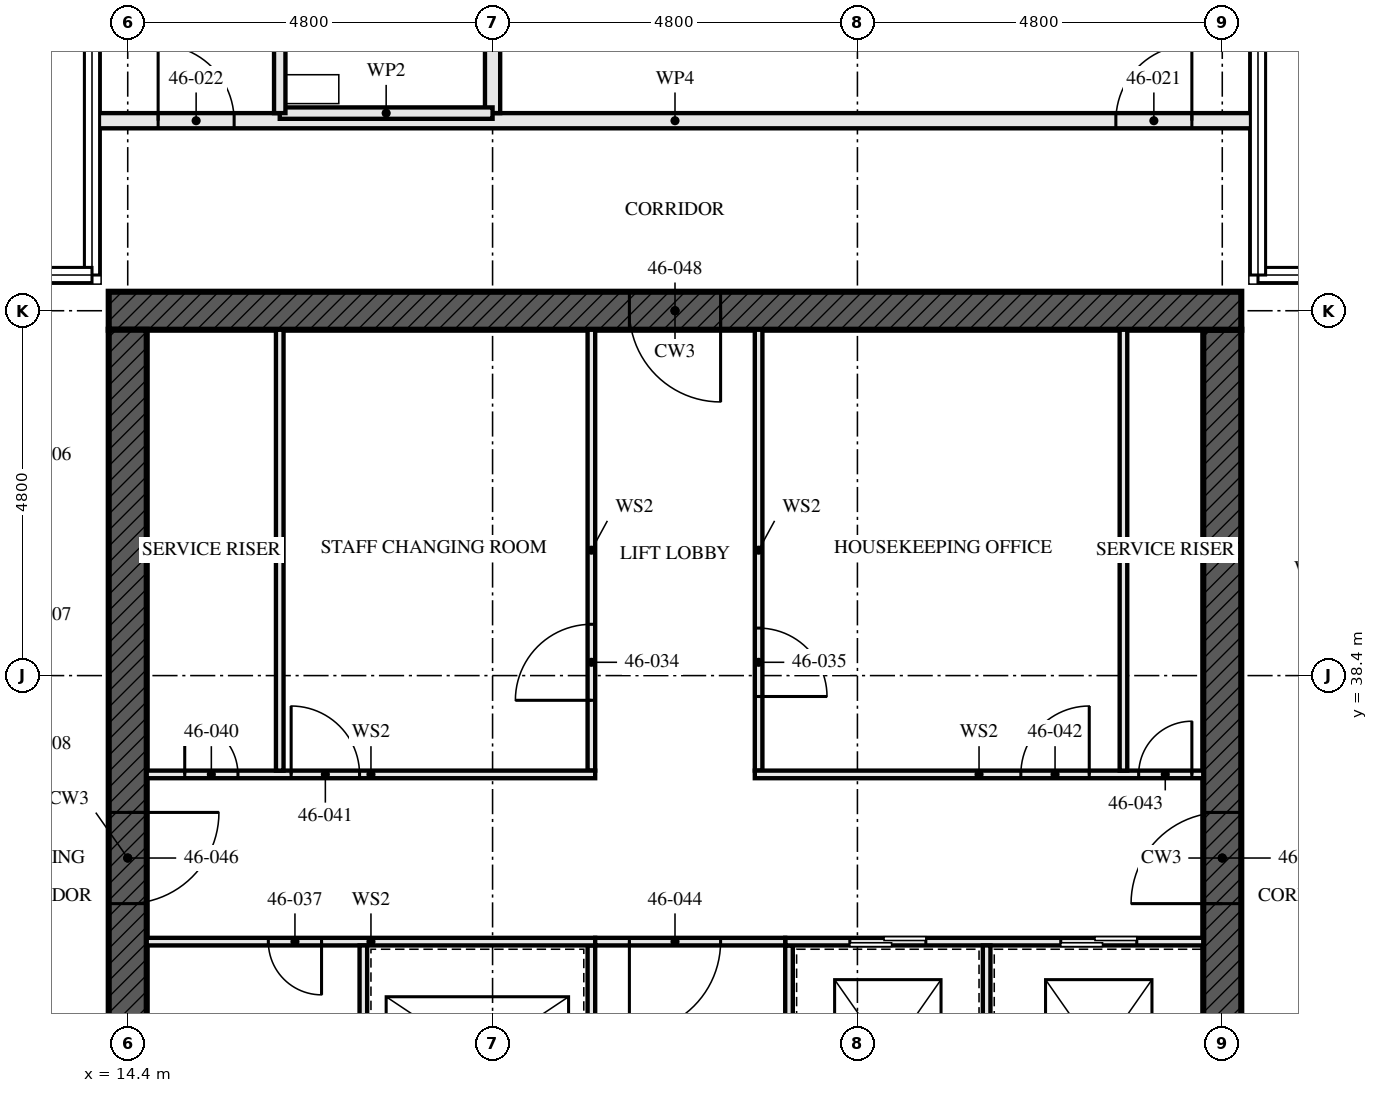
"""IFC4 building model, lengths in metres.
Left out: names, types, materials, properties, quantities, classifications, styles, units other than length and angle.
Written with IfcOpenShell. Run it as: python <this file> out.ifc"""

import sys

from ifc_helpers import new_model, si_unit, direction, frame, frame_2d, origin, place, context, subcontext, project, spatial, rectangle, extrude, element, fill, save


model = new_model("IFC4")
c1 = context("Model", 3, precision=1e-05, world=origin(), true_north=direction((0.0, 1.0)))
c2 = subcontext(c1, "Body", "Model", "MODEL_VIEW")
j1 = project(units=[si_unit("LENGTHUNIT", "METRE"), si_unit("PLANEANGLEUNIT", "RADIAN")], contexts=[c1])
p1 = place(None, origin())
s1 = spatial("IfcSite", under=j1, at=p1, CompositionType="ELEMENT")
p2 = place(p1, origin())
s2 = spatial("IfcBuilding", under=s1, at=p2, CompositionType="ELEMENT")
p3 = place(p2, frame((0.0, 0.0, 169.0)))
s3 = spatial("IfcBuildingStorey", under=s2, at=p3, CompositionType="ELEMENT", Elevation=169.0)
p4 = place(p3, frame((29.05, 43.2, -0.17), z_axis=(0.0, 0.0, 1.0), x_axis=(-1.0, 0.0, 0.0)))
e1 = element("IfcWall", 1, at=p4, inside=s3, PredefinedType="SHEAR", context=c2, shape_type="SweptSolid", body=[
    extrude(rectangle(XDim=14.9, YDim=0.5, at=frame_2d((7.45, 0.0))), origin(), (0.0, 0.0, 1.0), 3.5),
])
p5 = place(p4, frame((6.85, 0.0, 0.17)))
e2 = element("IfcOpeningElement", 2, at=p5, cuts=e1, PredefinedType="OPENING", context=c2, shape_type="SweptSolid", body=[
    extrude(rectangle(XDim=1.2, YDim=2.1, at=frame_2d((0.6, 1.05))), frame((0.0, 0.26, 0.0), z_axis=(0.0, -1.0, 0.0), x_axis=(1.0, 0.0, 0.0)), (0.0, 0.0, 1.0), 0.521),
])
p6 = place(p3, frame((14.4, 42.95, -0.17), z_axis=(0.0, 0.0, 1.0), x_axis=(0.0, -1.0, 0.0)))
e3 = element("IfcWall", 3, at=p6, inside=s3, PredefinedType="SHEAR", context=c2, shape_type="SweptSolid", body=[
    extrude(rectangle(XDim=13.9, YDim=0.5, at=frame_2d((6.95, 0.0))), origin(), (0.0, 0.0, 1.0), 3.5),
])
p7 = place(p6, frame((6.35, 0.0, 0.17)))
e4 = element("IfcOpeningElement", 4, at=p7, cuts=e3, PredefinedType="OPENING", context=c2, shape_type="SweptSolid", body=[
    extrude(rectangle(XDim=1.2, YDim=2.1, at=frame_2d((0.6, 1.05))), frame((0.0, 0.26, 0.0), z_axis=(0.0, -1.0, 0.0), x_axis=(1.0, 0.0, 0.0)), (0.0, 0.0, 1.0), 0.521),
])
p8 = place(p3, frame((28.8, 29.05, -0.17), z_axis=(0.0, 0.0, 1.0), x_axis=(0.0, 1.0, 0.0)))
e5 = element("IfcWall", 5, at=p8, inside=s3, PredefinedType="SHEAR", context=c2, shape_type="SweptSolid", body=[
    extrude(rectangle(XDim=13.9, YDim=0.5, at=frame_2d((6.95, 0.0))), origin(), (0.0, 0.0, 1.0), 3.5),
])
p9 = place(p8, frame((6.35, 0.0, 0.17)))
e6 = element("IfcOpeningElement", 6, at=p9, cuts=e5, PredefinedType="OPENING", context=c2, shape_type="SweptSolid", body=[
    extrude(rectangle(XDim=1.2, YDim=2.1, at=frame_2d((0.6, 1.05))), frame((0.0, 0.26, 0.0), z_axis=(0.0, -1.0, 0.0), x_axis=(1.0, 0.0, 0.0)), (0.0, 0.0, 1.0), 0.521),
])
p10 = place(p3, frame((19.2, 52.48, 0.0), z_axis=(0.0, 0.0, 1.0), x_axis=(0.0, -1.0, 0.0)))
e7 = element("IfcWall", 7, at=p10, inside=s3, PredefinedType="PARTITIONING", context=c2, shape_type="SweptSolid", body=[
    extrude(rectangle(XDim=6.68, YDim=0.2, at=frame_2d((3.34, 0.0))), origin(), (0.0, 0.0, 1.0), 2.55),
])
p11 = place(p3, frame((16.4, 48.8, 0.0), z_axis=(0.0, 0.0, 1.0), x_axis=(0.0, -1.0, 0.0)))
e8 = element("IfcWall", 8, at=p11, inside=s3, PredefinedType="PARTITIONING", context=c2, shape_type="SweptSolid", body=[
    extrude(rectangle(XDim=3.0, YDim=0.15, at=frame_2d((1.5, 0.0))), origin(), (0.0, 0.0, 1.0), 2.55),
])
p12 = place(p11, frame((1.05, 0.0, 0.0)))
e9 = element("IfcOpeningElement", 9, at=p12, cuts=e8, PredefinedType="OPENING", context=c2, shape_type="SweptSolid", body=[
    extrude(rectangle(XDim=0.9, YDim=2.1, at=frame_2d((0.45, 1.05))), frame((0.0, 0.085, 0.0), z_axis=(0.0, -1.0, 0.0), x_axis=(1.0, 0.0, 0.0)), (0.0, 0.0, 1.0), 0.171),
])
p13 = place(p3, frame((19.2, 45.8, 0.0), z_axis=(0.0, 0.0, 1.0), x_axis=(-1.0, 0.0, 0.0)))
e10 = element("IfcWall", 10, at=p13, inside=s3, PredefinedType="PARTITIONING", context=c2, shape_type="SweptSolid", body=[
    extrude(rectangle(XDim=2.8, YDim=0.15, at=frame_2d((1.4, 0.0))), origin(), (0.0, 0.0, 1.0), 3.33),
])
p14 = place(p3, frame((29.25, 45.7, 0.0), z_axis=(0.0, 0.0, 1.0), x_axis=(-1.0, 0.0, 0.0)))
e11 = element("IfcWall", 11, at=p14, inside=s3, PredefinedType="PARTITIONING", context=c2, shape_type="SweptSolid", body=[
    extrude(rectangle(XDim=15.3, YDim=0.2, at=frame_2d((7.65, 0.0))), origin(), (0.0, 0.0, 1.0), 2.32),
])
p15 = place(p14, frame((0.85, 0.0, 0.0)))
e12 = element("IfcOpeningElement", 12, at=p15, cuts=e11, PredefinedType="OPENING", context=c2, shape_type="SweptSolid", body=[
    extrude(rectangle(XDim=1.0, YDim=2.1, at=frame_2d((0.5, 1.05))), frame((0.0, 0.111, 0.0), z_axis=(0.0, -1.0, 0.0), x_axis=(1.0, 0.0, 0.0)), (0.0, 0.0, 1.0), 0.221),
])
p16 = place(p14, frame((13.45, 0.0, 0.0)))
e13 = element("IfcOpeningElement", 13, at=p16, cuts=e11, PredefinedType="OPENING", context=c2, shape_type="SweptSolid", body=[
    extrude(rectangle(XDim=1.0, YDim=2.1, at=frame_2d((0.5, 1.05))), frame((0.0, 0.111, 0.0), z_axis=(0.0, -1.0, 0.0), x_axis=(1.0, 0.0, 0.0)), (0.0, 0.0, 1.0), 0.221),
])
for number, where, z_axis, x_axis in (
    (14, (16.4, 37.15, 0.0), (0.0, 0.0, 1.0), (0.0, 1.0, 0.0)),
    (15, (27.5, 37.15, 0.0), (0.0, 0.0, 1.0), (0.0, 1.0, 0.0)),
):
    element("IfcWall", number, at=place(p3, frame(where, z_axis=z_axis, x_axis=x_axis)), inside=s3, PredefinedType="SOLIDWALL", context=c2, shape_type="SweptSolid", body=[
        extrude(rectangle(XDim=5.8, YDim=0.1, at=frame_2d((2.9, 0.0))), origin(), (0.0, 0.0, 1.0), 3.33),
    ])
p17 = place(p3, frame((20.5, 29.05, 0.0), z_axis=(0.0, 0.0, 1.0), x_axis=(0.0, 1.0, 0.0)))
e16 = element("IfcWall", 16, at=p17, inside=s3, PredefinedType="SOLIDWALL", context=c2, shape_type="SweptSolid", body=[
    extrude(rectangle(XDim=5.8, YDim=0.1, at=frame_2d((2.9, 0.0))), origin(), (0.0, 0.0, 1.0), 3.33),
])
p18 = place(p17, frame((0.8, 0.0, 0.0)))
e17 = element("IfcOpeningElement", 17, at=p18, cuts=e16, PredefinedType="OPENING", context=c2, shape_type="SweptSolid", body=[
    extrude(rectangle(XDim=1.1, YDim=2.3, at=frame_2d((0.55, 1.15))), frame((0.0, 0.061, 0.0), z_axis=(0.0, -1.0, 0.0), x_axis=(1.0, 0.0, 0.0)), (0.0, 0.0, 1.0), 0.121),
])
p19 = place(p17, frame((3.775, 0.0, 0.0)))
e18 = element("IfcOpeningElement", 18, at=p19, cuts=e16, PredefinedType="OPENING", context=c2, shape_type="SweptSolid", body=[
    extrude(rectangle(XDim=1.1, YDim=2.3, at=frame_2d((0.55, 1.15))), frame((0.0, 0.061, 0.0), z_axis=(0.0, -1.0, 0.0), x_axis=(1.0, 0.0, 0.0)), (0.0, 0.0, 1.0), 0.121),
])
p20 = place(p3, frame((20.5, 37.15, 0.0), z_axis=(0.0, 0.0, 1.0), x_axis=(0.0, 1.0, 0.0)))
e19 = element("IfcWall", 19, at=p20, inside=s3, PredefinedType="SOLIDWALL", context=c2, shape_type="SweptSolid", body=[
    extrude(rectangle(XDim=5.8, YDim=0.1, at=frame_2d((2.9, 0.0))), origin(), (0.0, 0.0, 1.0), 3.33),
])
p21 = place(p20, frame((0.925, 0.0, 0.0)))
e20 = element("IfcOpeningElement", 20, at=p21, cuts=e19, PredefinedType="OPENING", context=c2, shape_type="SweptSolid", body=[
    extrude(rectangle(XDim=1.0, YDim=2.1, at=frame_2d((0.5, 1.05))), frame((0.0, 0.061, 0.0), z_axis=(0.0, -1.0, 0.0), x_axis=(1.0, 0.0, 0.0)), (0.0, 0.0, 1.0), 0.121),
])
p22 = place(p3, frame((22.7, 37.15, 0.0), z_axis=(0.0, 0.0, 1.0), x_axis=(0.0, 1.0, 0.0)))
e21 = element("IfcWall", 21, at=p22, inside=s3, PredefinedType="SOLIDWALL", context=c2, shape_type="SweptSolid", body=[
    extrude(rectangle(XDim=5.8, YDim=0.1, at=frame_2d((2.9, 0.0))), origin(), (0.0, 0.0, 1.0), 3.33),
])
p23 = place(p22, frame((0.975, 0.0, 0.0)))
e22 = element("IfcOpeningElement", 22, at=p23, cuts=e21, PredefinedType="OPENING", context=c2, shape_type="SweptSolid", body=[
    extrude(rectangle(XDim=0.9, YDim=2.1, at=frame_2d((0.45, 1.05))), frame((0.0, 0.061, 0.0), z_axis=(0.0, -1.0, 0.0), x_axis=(1.0, 0.0, 0.0)), (0.0, 0.0, 1.0), 0.121),
])
p24 = place(p3, frame((23.1, 29.05, 0.0), z_axis=(0.0, 0.0, 1.0), x_axis=(0.0, 1.0, 0.0)))
e23 = element("IfcWall", 23, at=p24, inside=s3, PredefinedType="SOLIDWALL", context=c2, shape_type="SweptSolid", body=[
    extrude(rectangle(XDim=5.8, YDim=0.1, at=frame_2d((2.9, 0.0))), origin(), (0.0, 0.0, 1.0), 3.33),
])
p25 = place(p24, frame((1.0, 0.0, 0.0)))
e24 = element("IfcOpeningElement", 24, at=p25, cuts=e23, PredefinedType="OPENING", context=c2, shape_type="SweptSolid", body=[
    extrude(rectangle(XDim=0.7, YDim=2.1, at=frame_2d((0.35, 1.05))), frame((0.0, 0.061, 0.0), z_axis=(0.0, -1.0, 0.0), x_axis=(1.0, 0.0, 0.0)), (0.0, 0.0, 1.0), 0.121),
])
p26 = place(p3, frame((14.65, 34.9, 0.0), z_axis=(0.0, 0.0, 1.0), x_axis=(1.0, 0.0, 0.0)))
e25 = element("IfcWall", 25, at=p26, inside=s3, PredefinedType="SOLIDWALL", context=c2, shape_type="SweptSolid", body=[
    extrude(rectangle(XDim=5.9, YDim=0.1, at=frame_2d((2.95, 0.0))), origin(), (0.0, 0.0, 1.0), 3.33),
])
p27 = place(p26, frame((1.6, 0.0, 0.0)))
e26 = element("IfcOpeningElement", 26, at=p27, cuts=e25, PredefinedType="OPENING", context=c2, shape_type="SweptSolid", body=[
    extrude(rectangle(XDim=0.7, YDim=2.1, at=frame_2d((0.35, 1.05))), frame((0.0, 0.061, 0.0), z_axis=(0.0, -1.0, 0.0), x_axis=(1.0, 0.0, 0.0)), (0.0, 0.0, 1.0), 0.121),
])
p28 = place(p3, frame((23.05, 34.9, 0.0), z_axis=(0.0, 0.0, 1.0), x_axis=(1.0, 0.0, 0.0)))
e27 = element("IfcWall", 27, at=p28, inside=s3, PredefinedType="SOLIDWALL", context=c2, shape_type="SweptSolid", body=[
    extrude(rectangle(XDim=5.5, YDim=0.1, at=frame_2d((2.75, 0.0))), origin(), (0.0, 0.0, 1.0), 3.33),
])
p29 = place(p28, frame((0.85, 0.0, 0.0)))
e28 = element("IfcOpeningElement", 28, at=p29, cuts=e27, PredefinedType="OPENING", context=c2, shape_type="SweptSolid", body=[
    extrude(rectangle(XDim=1.0, YDim=2.1, at=frame_2d((0.5, 1.05))), frame((0.0, 0.061, 0.0), z_axis=(0.0, -1.0, 0.0), x_axis=(1.0, 0.0, 0.0)), (0.0, 0.0, 1.0), 0.121),
])
p30 = place(p28, frame((3.625, 0.0, 0.0)))
e29 = element("IfcOpeningElement", 29, at=p30, cuts=e27, PredefinedType="OPENING", context=c2, shape_type="SweptSolid", body=[
    extrude(rectangle(XDim=1.0, YDim=2.1, at=frame_2d((0.5, 1.05))), frame((0.0, 0.061, 0.0), z_axis=(0.0, -1.0, 0.0), x_axis=(1.0, 0.0, 0.0)), (0.0, 0.0, 1.0), 0.121),
])
p31 = place(p3, frame((14.65, 37.1, 0.0), z_axis=(0.0, 0.0, 1.0), x_axis=(1.0, 0.0, 0.0)))
e30 = element("IfcWall", 30, at=p31, inside=s3, PredefinedType="SOLIDWALL", context=c2, shape_type="SweptSolid", body=[
    extrude(rectangle(XDim=5.9, YDim=0.1, at=frame_2d((2.95, 0.0))), origin(), (0.0, 0.0, 1.0), 3.33),
])
p32 = place(p31, frame((0.5, 0.0, 0.0)))
e31 = element("IfcOpeningElement", 31, at=p32, cuts=e30, PredefinedType="OPENING", context=c2, shape_type="SweptSolid", body=[
    extrude(rectangle(XDim=0.7, YDim=2.1, at=frame_2d((0.35, 1.05))), frame((0.0, 0.061, 0.0), z_axis=(0.0, -1.0, 0.0), x_axis=(1.0, 0.0, 0.0)), (0.0, 0.0, 1.0), 0.121),
])
p33 = place(p31, frame((1.9, 0.0, 0.0)))
e32 = element("IfcOpeningElement", 32, at=p33, cuts=e30, PredefinedType="OPENING", context=c2, shape_type="SweptSolid", body=[
    extrude(rectangle(XDim=0.9, YDim=2.1, at=frame_2d((0.45, 1.05))), frame((0.0, 0.061, 0.0), z_axis=(0.0, -1.0, 0.0), x_axis=(1.0, 0.0, 0.0)), (0.0, 0.0, 1.0), 0.121),
])
p34 = place(p3, frame((22.65, 37.1, 0.0), z_axis=(0.0, 0.0, 1.0), x_axis=(1.0, 0.0, 0.0)))
e33 = element("IfcWall", 33, at=p34, inside=s3, PredefinedType="SOLIDWALL", context=c2, shape_type="SweptSolid", body=[
    extrude(rectangle(XDim=5.9, YDim=0.1, at=frame_2d((2.95, 0.0))), origin(), (0.0, 0.0, 1.0), 3.33),
])
p35 = place(p34, frame((3.5, 0.0, 0.0)))
e34 = element("IfcOpeningElement", 34, at=p35, cuts=e33, PredefinedType="OPENING", context=c2, shape_type="SweptSolid", body=[
    extrude(rectangle(XDim=0.9, YDim=2.1, at=frame_2d((0.45, 1.05))), frame((0.0, 0.061, 0.0), z_axis=(0.0, -1.0, 0.0), x_axis=(1.0, 0.0, 0.0)), (0.0, 0.0, 1.0), 0.121),
])
p36 = place(p34, frame((5.05, 0.0, 0.0)))
e35 = element("IfcOpeningElement", 35, at=p36, cuts=e33, PredefinedType="OPENING", context=c2, shape_type="SweptSolid", body=[
    extrude(rectangle(XDim=0.7, YDim=2.1, at=frame_2d((0.35, 1.05))), frame((0.0, 0.061, 0.0), z_axis=(0.0, -1.0, 0.0), x_axis=(1.0, 0.0, 0.0)), (0.0, 0.0, 1.0), 0.121),
])
p37 = place(p3, frame((20.55, 34.9, 0.0), z_axis=(0.0, 0.0, 1.0), x_axis=(1.0, 0.0, 0.0)))
e36 = element("IfcWall", 36, at=p37, inside=s3, PredefinedType="SOLIDWALL", context=c2, shape_type="SweptSolid", body=[
    extrude(rectangle(XDim=2.5, YDim=0.1, at=frame_2d((1.25, 0.0))), origin(), (0.0, 0.0, 1.0), 3.33),
])
p38 = place(p37, frame((0.45, 0.0, 0.0)))
e37 = element("IfcOpeningElement", 37, at=p38, cuts=e36, PredefinedType="OPENING", context=c2, shape_type="SweptSolid", body=[
    extrude(rectangle(XDim=1.2, YDim=2.1, at=frame_2d((0.6, 1.05))), frame((0.0, 0.061, 0.0), z_axis=(0.0, -1.0, 0.0), x_axis=(1.0, 0.0, 0.0)), (0.0, 0.0, 1.0), 0.121),
])
p39 = place(p3, frame((17.5, 29.05, 0.0), z_axis=(0.0, 0.0, 1.0), x_axis=(0.0, 1.0, 0.0)))
e38 = element("IfcWall", 38, at=p39, inside=s3, PredefinedType="SOLIDWALL", context=c2, shape_type="SweptSolid", body=[
    extrude(rectangle(XDim=5.8, YDim=0.1, at=frame_2d((2.9, 0.0))), origin(), (0.0, 0.0, 1.0), 3.33),
])
p40 = place(p3, frame((25.7, 31.95, 0.0), z_axis=(0.0, 0.0, 1.0), x_axis=(0.0, 1.0, 0.0)))
e39 = element("IfcWall", 39, at=p40, inside=s3, PredefinedType="SOLIDWALL", context=c2, shape_type="SweptSolid", body=[
    extrude(rectangle(XDim=2.9, YDim=0.1, at=frame_2d((1.45, 0.0))), origin(), (0.0, 0.0, 1.0), 3.33),
])
p41 = place(p15, frame((1.0, 0.0, 0.0), z_axis=(0.0, 0.0, 1.0), x_axis=(-1.0, 0.0, 0.0)))
e40 = element("IfcDoor", 40, at=p41, inside=s3, OperationType="SINGLE_SWING_LEFT", PredefinedType="DOOR", context=c2, shape_type="SweptSolid", body=[
    extrude(rectangle(XDim=1.0, YDim=2.1, at=frame_2d((0.5, 1.05))), frame((0.0, 0.027, 0.0), z_axis=(0.0, -1.0, 0.0), x_axis=(1.0, 0.0, 0.0)), (0.0, 0.0, 1.0), 0.054),
])
fill(e12, e40)
p42 = place(p16, frame((1.0, 0.0, 0.0), z_axis=(0.0, 0.0, 1.0), x_axis=(-1.0, 0.0, 0.0)))
e41 = element("IfcDoor", 41, at=p42, inside=s3, OperationType="SINGLE_SWING_RIGHT", PredefinedType="DOOR", context=c2, shape_type="SweptSolid", body=[
    extrude(rectangle(XDim=1.0, YDim=2.1, at=frame_2d((0.5, 1.05))), frame((0.0, 0.027, 0.0), z_axis=(0.0, -1.0, 0.0), x_axis=(1.0, 0.0, 0.0)), (0.0, 0.0, 1.0), 0.054),
])
fill(e13, e41)
p43 = place(p21, origin())
e42 = element("IfcDoor", 42, at=p43, inside=s3, OperationType="SINGLE_SWING_RIGHT", PredefinedType="DOOR", context=c2, shape_type="SweptSolid", body=[
    extrude(rectangle(XDim=1.0, YDim=2.1, at=frame_2d((0.5, 1.05))), frame((0.0, 0.027, 0.0), z_axis=(0.0, -1.0, 0.0), x_axis=(1.0, 0.0, 0.0)), (0.0, 0.0, 1.0), 0.054),
])
fill(e20, e42)
p44 = place(p23, frame((0.9, 0.0, 0.0), z_axis=(0.0, 0.0, 1.0), x_axis=(-1.0, 0.0, 0.0)))
e43 = element("IfcDoor", 43, at=p44, inside=s3, OperationType="SINGLE_SWING_LEFT", PredefinedType="DOOR", context=c2, shape_type="SweptSolid", body=[
    extrude(rectangle(XDim=0.9, YDim=2.1, at=frame_2d((0.45, 1.05))), frame((0.0, 0.027, 0.0), z_axis=(0.0, -1.0, 0.0), x_axis=(1.0, 0.0, 0.0)), (0.0, 0.0, 1.0), 0.054),
])
fill(e22, e43)
p45 = place(p27, frame((0.7, 0.0, 0.0), z_axis=(0.0, 0.0, 1.0), x_axis=(-1.0, 0.0, 0.0)))
e44 = element("IfcDoor", 44, at=p45, inside=s3, OperationType="SINGLE_SWING_RIGHT", PredefinedType="DOOR", context=c2, shape_type="SweptSolid", body=[
    extrude(rectangle(XDim=0.7, YDim=2.1, at=frame_2d((0.35, 1.05))), frame((0.0, 0.027, 0.0), z_axis=(0.0, -1.0, 0.0), x_axis=(1.0, 0.0, 0.0)), (0.0, 0.0, 1.0), 0.054),
])
fill(e26, e44)
p46 = place(p29, origin())
e45 = element("IfcDoor", 45, at=p46, inside=s3, OperationType="SLIDING_TO_LEFT", PredefinedType="DOOR", context=c2, shape_type="SweptSolid", body=[
    extrude(rectangle(XDim=1.0, YDim=2.1, at=frame_2d((0.5, 1.05))), frame((0.0, 0.05, 0.0), z_axis=(0.0, -1.0, 0.0), x_axis=(1.0, 0.0, 0.0)), (0.0, 0.0, 1.0), 0.1),
])
fill(e28, e45)
p47 = place(p30, origin())
e46 = element("IfcDoor", 46, at=p47, inside=s3, OperationType="SLIDING_TO_LEFT", PredefinedType="DOOR", context=c2, shape_type="SweptSolid", body=[
    extrude(rectangle(XDim=1.0, YDim=2.1, at=frame_2d((0.5, 1.05))), frame((0.0, 0.05, 0.0), z_axis=(0.0, -1.0, 0.0), x_axis=(1.0, 0.0, 0.0)), (0.0, 0.0, 1.0), 0.1),
])
fill(e29, e46)
p48 = place(p32, origin())
e47 = element("IfcDoor", 47, at=p48, inside=s3, OperationType="SINGLE_SWING_RIGHT", PredefinedType="DOOR", context=c2, shape_type="SweptSolid", body=[
    extrude(rectangle(XDim=0.7, YDim=2.1, at=frame_2d((0.35, 1.05))), frame((0.0, 0.027, 0.0), z_axis=(0.0, -1.0, 0.0), x_axis=(1.0, 0.0, 0.0)), (0.0, 0.0, 1.0), 0.054),
])
fill(e31, e47)
p49 = place(p33, origin())
e48 = element("IfcDoor", 48, at=p49, inside=s3, OperationType="SINGLE_SWING_RIGHT", PredefinedType="DOOR", context=c2, shape_type="SweptSolid", body=[
    extrude(rectangle(XDim=0.9, YDim=2.1, at=frame_2d((0.45, 1.05))), frame((0.0, 0.027, 0.0), z_axis=(0.0, -1.0, 0.0), x_axis=(1.0, 0.0, 0.0)), (0.0, 0.0, 1.0), 0.054),
])
fill(e32, e48)
p50 = place(p35, origin())
e49 = element("IfcDoor", 49, at=p50, inside=s3, OperationType="SINGLE_SWING_LEFT", PredefinedType="DOOR", context=c2, shape_type="SweptSolid", body=[
    extrude(rectangle(XDim=0.9, YDim=2.1, at=frame_2d((0.45, 1.05))), frame((0.0, 0.027, 0.0), z_axis=(0.0, -1.0, 0.0), x_axis=(1.0, 0.0, 0.0)), (0.0, 0.0, 1.0), 0.054),
])
fill(e34, e49)
p51 = place(p36, origin())
e50 = element("IfcDoor", 50, at=p51, inside=s3, OperationType="SINGLE_SWING_LEFT", PredefinedType="DOOR", context=c2, shape_type="SweptSolid", body=[
    extrude(rectangle(XDim=0.7, YDim=2.1, at=frame_2d((0.35, 1.05))), frame((0.0, 0.027, 0.0), z_axis=(0.0, -1.0, 0.0), x_axis=(1.0, 0.0, 0.0)), (0.0, 0.0, 1.0), 0.054),
])
fill(e35, e50)
p52 = place(p38, frame((1.2, 0.0, 0.0), z_axis=(0.0, 0.0, 1.0), x_axis=(-1.0, 0.0, 0.0)))
e51 = element("IfcDoor", 51, at=p52, inside=s3, OperationType="SINGLE_SWING_LEFT", PredefinedType="DOOR", context=c2, shape_type="SweptSolid", body=[
    extrude(rectangle(XDim=1.2, YDim=2.1, at=frame_2d((0.6, 1.05))), frame((0.0, 0.027, 0.0), z_axis=(0.0, -1.0, 0.0), x_axis=(1.0, 0.0, 0.0)), (0.0, 0.0, 1.0), 0.054),
])
fill(e37, e51)
p53 = place(p7, origin())
e52 = element("IfcDoor", 52, at=p53, inside=s3, OperationType="SINGLE_SWING_LEFT", PredefinedType="DOOR", context=c2, shape_type="SweptSolid", body=[
    extrude(rectangle(XDim=1.2, YDim=2.1, at=frame_2d((0.6, 1.05))), frame((0.0, 0.027, 0.0), z_axis=(0.0, -1.0, 0.0), x_axis=(1.0, 0.0, 0.0)), (0.0, 0.0, 1.0), 0.054),
])
fill(e4, e52)
p54 = place(p9, origin())
e53 = element("IfcDoor", 53, at=p54, inside=s3, OperationType="SINGLE_SWING_LEFT", PredefinedType="DOOR", context=c2, shape_type="SweptSolid", body=[
    extrude(rectangle(XDim=1.2, YDim=2.1, at=frame_2d((0.6, 1.05))), frame((0.0, 0.027, 0.0), z_axis=(0.0, -1.0, 0.0), x_axis=(1.0, 0.0, 0.0)), (0.0, 0.0, 1.0), 0.054),
])
fill(e6, e53)
p55 = place(p5, origin())
e54 = element("IfcDoor", 54, at=p55, inside=s3, OperationType="SINGLE_SWING_LEFT", PredefinedType="DOOR", context=c2, shape_type="SweptSolid", body=[
    extrude(rectangle(XDim=1.2, YDim=2.1, at=frame_2d((0.6, 1.05))), frame((0.0, 0.027, 0.0), z_axis=(0.0, -1.0, 0.0), x_axis=(1.0, 0.0, 0.0)), (0.0, 0.0, 1.0), 0.054),
])
fill(e2, e54)
save(model, sys.argv[1])
